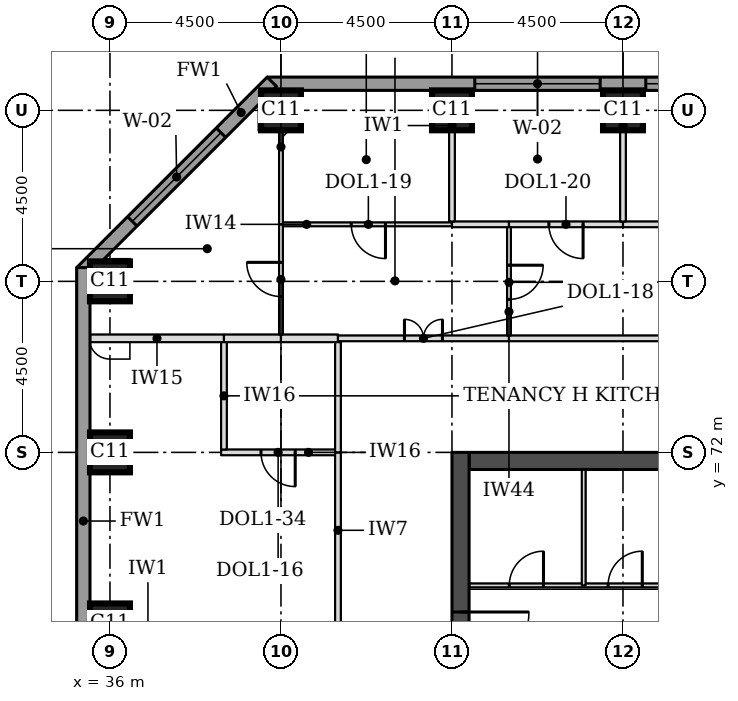
"""IFC4 building model, lengths in metres.
Left out: names, types, materials, properties, quantities, classifications, styles, units other than length and angle.
Written with IfcOpenShell. Run it as: python <this file> out.ifc"""

import sys

from ifc_helpers import new_model, si_unit, direction, frame, frame_2d, origin, origin_2d, place, context, subcontext, project, spatial, rectangle, extrude, element, fill, save


model = new_model("IFC4")
c1 = context("Model", 3, precision=1e-05, world=origin(), true_north=direction((0.0, 1.0)))
c2 = subcontext(c1, "Body", "Model", "MODEL_VIEW")
j1 = project(units=[si_unit("LENGTHUNIT", "METRE"), si_unit("PLANEANGLEUNIT", "RADIAN")], contexts=[c1])
p1 = place(None, origin())
s1 = spatial("IfcSite", under=j1, at=p1, CompositionType="ELEMENT")
p2 = place(p1, origin())
s2 = spatial("IfcBuilding", under=s1, at=p2, CompositionType="ELEMENT")
p3 = place(p2, frame((0.0, 0.0, 78.9)))
s3 = spatial("IfcBuildingStorey", under=s2, at=p3, CompositionType="ELEMENT", Elevation=78.9)
for number, where, z_axis, x_axis in (
    (1, (36.0, 67.5, 0.0), (0.0, 0.0, 1.0), (1.0, 0.0, 0.0)),
    (2, (36.0, 72.0, 0.0), (0.0, 0.0, 1.0), (1.0, 0.0, 0.0)),
    (3, (36.0, 76.5, 0.0), (0.0, 0.0, 1.0), (1.0, 0.0, 0.0)),
    (4, (40.5, 81.0, 0.0), (0.0, 0.0, 1.0), (1.0, 0.0, 0.0)),
    (5, (45.0, 81.0, 0.0), (0.0, 0.0, 1.0), (1.0, 0.0, 0.0)),
    (6, (49.5, 81.0, 0.0), (0.0, 0.0, 1.0), (1.0, 0.0, 0.0)),
):
    element("IfcColumn", number, at=place(p3, frame(where, z_axis=z_axis, x_axis=x_axis)), inside=s3, PredefinedType="COLUMN", context=c2, shape_type="SweptSolid", body=[
        extrude(rectangle(XDim=1.05, YDim=1.05, at=origin_2d()), origin(), (0.0, 0.0, 1.0), 3.7),
    ])
p4 = place(p3, frame((45.45, 71.775, 0.0), z_axis=(0.0, 0.0, 1.0), x_axis=(1.0, 0.0, 0.0)))
e7 = element("IfcWall", 7, at=p4, inside=s3, PredefinedType="SHEAR", context=c2, shape_type="SweptSolid", body=[
    extrude(rectangle(XDim=21.6, YDim=0.45, at=frame_2d((10.8, 0.0))), origin(), (0.0, 0.0, 1.0), 3.7),
])
p5 = place(p3, frame((45.225, 49.5, 0.0), z_axis=(0.0, 0.0, 1.0), x_axis=(0.0, 1.0, 0.0)))
e8 = element("IfcWall", 8, at=p5, inside=s3, PredefinedType="SHEAR", context=c2, shape_type="SweptSolid", body=[
    extrude(rectangle(XDim=22.5, YDim=0.45, at=frame_2d((11.25, 0.0))), origin(), (0.0, 0.0, 1.0), 3.7),
])
p6 = place(p5, frame((4.2, 0.0, 0.0)))
e9 = element("IfcOpeningElement", 9, at=p6, cuts=e8, PredefinedType="OPENING", context=c2, shape_type="SweptSolid", body=[
    extrude(rectangle(XDim=1.8, YDim=2.1, at=frame_2d((0.9, 1.05))), frame((0.0, 0.235, 0.0), z_axis=(0.0, -1.0, 0.0), x_axis=(1.0, 0.0, 0.0)), (0.0, 0.0, 1.0), 0.47),
])
p7 = place(p5, frame((6.9, 0.0, 0.0)))
e10 = element("IfcOpeningElement", 10, at=p7, cuts=e8, PredefinedType="OPENING", context=c2, shape_type="SweptSolid", body=[
    extrude(rectangle(XDim=1.1, YDim=2.1, at=frame_2d((0.55, 1.05))), frame((0.0, 0.235, 0.0), z_axis=(0.0, -1.0, 0.0), x_axis=(1.0, 0.0, 0.0)), (0.0, 0.0, 1.0), 0.47),
])
p8 = place(p5, frame((13.6, 0.0, 0.0)))
e11 = element("IfcOpeningElement", 11, at=p8, cuts=e8, PredefinedType="OPENING", context=c2, shape_type="SweptSolid", body=[
    extrude(rectangle(XDim=1.1, YDim=2.1, at=frame_2d((0.55, 1.05))), frame((0.0, 0.235, 0.0), z_axis=(0.0, -1.0, 0.0), x_axis=(1.0, 0.0, 0.0)), (0.0, 0.0, 1.0), 0.47),
])
p9 = place(p5, frame((16.5, 0.0, 0.0)))
e12 = element("IfcOpeningElement", 12, at=p9, cuts=e8, PredefinedType="OPENING", context=c2, shape_type="SweptSolid", body=[
    extrude(rectangle(XDim=1.8, YDim=2.1, at=frame_2d((0.9, 1.05))), frame((0.0, 0.235, 0.0), z_axis=(0.0, -1.0, 0.0), x_axis=(1.0, 0.0, 0.0)), (0.0, 0.0, 1.0), 0.47),
])
p10 = place(p3, frame((72.362, 81.7, 0.0), z_axis=(0.0, 0.0, 1.0), x_axis=(-1.0, 0.0, 0.0)))
e13 = element("IfcWall", 13, at=p10, inside=s3, PredefinedType="STANDARD", context=c2, shape_type="SweptSolid", body=[
    extrude(rectangle(XDim=32.225, YDim=0.35, at=frame_2d((16.112, 0.0))), origin(), (0.0, 0.0, 1.0), 3.525),
])
p11 = place(p10, frame((5.462, 0.0, 0.9)))
e14 = element("IfcOpeningElement", 14, at=p11, cuts=e13, PredefinedType="OPENING", context=c2, shape_type="SweptSolid", body=[
    extrude(rectangle(XDim=3.3, YDim=1.9, at=frame_2d((1.65, 0.95))), frame((0.0, 0.185, 0.0), z_axis=(0.0, -1.0, 0.0), x_axis=(1.0, 0.0, 0.0)), (0.0, 0.0, 1.0), 0.37),
])
p12 = place(p10, frame((9.962, 0.0, 0.9)))
e15 = element("IfcOpeningElement", 15, at=p12, cuts=e13, PredefinedType="OPENING", context=c2, shape_type="SweptSolid", body=[
    extrude(rectangle(XDim=3.3, YDim=1.9, at=frame_2d((1.65, 0.95))), frame((0.0, 0.185, 0.0), z_axis=(0.0, -1.0, 0.0), x_axis=(1.0, 0.0, 0.0)), (0.0, 0.0, 1.0), 0.37),
])
p13 = place(p10, frame((14.462, 0.0, 0.9)))
e16 = element("IfcOpeningElement", 16, at=p13, cuts=e13, PredefinedType="OPENING", context=c2, shape_type="SweptSolid", body=[
    extrude(rectangle(XDim=3.3, YDim=1.9, at=frame_2d((1.65, 0.95))), frame((0.0, 0.185, 0.0), z_axis=(0.0, -1.0, 0.0), x_axis=(1.0, 0.0, 0.0)), (0.0, 0.0, 1.0), 0.37),
])
p14 = place(p10, frame((18.962, 0.0, 0.9)))
e17 = element("IfcOpeningElement", 17, at=p14, cuts=e13, PredefinedType="OPENING", context=c2, shape_type="SweptSolid", body=[
    extrude(rectangle(XDim=3.3, YDim=1.9, at=frame_2d((1.65, 0.95))), frame((0.0, 0.185, 0.0), z_axis=(0.0, -1.0, 0.0), x_axis=(1.0, 0.0, 0.0)), (0.0, 0.0, 1.0), 0.37),
])
p15 = place(p10, frame((23.462, 0.0, 0.9)))
e18 = element("IfcOpeningElement", 18, at=p15, cuts=e13, PredefinedType="OPENING", context=c2, shape_type="SweptSolid", body=[
    extrude(rectangle(XDim=3.3, YDim=1.9, at=frame_2d((1.65, 0.95))), frame((0.0, 0.185, 0.0), z_axis=(0.0, -1.0, 0.0), x_axis=(1.0, 0.0, 0.0)), (0.0, 0.0, 1.0), 0.37),
])
p16 = place(p3, frame((40.261, 81.751, 0.0), z_axis=(0.0, 0.0, 1.0), x_axis=(-0.707106781187, -0.707106781187, 0.0)))
e19 = element("IfcWall", 19, at=p16, inside=s3, PredefinedType="STANDARD", context=c2, shape_type="SweptSolid", body=[
    extrude(rectangle(XDim=7.089, YDim=0.35, at=frame_2d((3.544, 0.0))), origin(), (0.0, 0.0, 1.0), 3.525),
])
p17 = place(p16, frame((1.894, 0.0, 0.9)))
e20 = element("IfcOpeningElement", 20, at=p17, cuts=e19, PredefinedType="OPENING", context=c2, shape_type="SweptSolid", body=[
    extrude(rectangle(XDim=3.3, YDim=1.9, at=frame_2d((1.65, 0.95))), frame((0.0, 0.185, 0.0), z_axis=(0.0, -1.0, 0.0), x_axis=(1.0, 0.0, 0.0)), (0.0, 0.0, 1.0), 0.37),
])
p18 = place(p3, frame((35.3, 76.862, 0.0), z_axis=(0.0, 0.0, 1.0), x_axis=(0.0, -1.0, 0.0)))
e21 = element("IfcWall", 21, at=p18, inside=s3, PredefinedType="STANDARD", context=c2, shape_type="SweptSolid", body=[
    extrude(rectangle(XDim=13.337, YDim=0.35, at=frame_2d((6.669, 0.0))), origin(), (0.0, 0.0, 1.0), 3.525),
])
p19 = place(p18, frame((9.537, 0.0, 0.9)))
e22 = element("IfcOpeningElement", 22, at=p19, cuts=e21, PredefinedType="OPENING", context=c2, shape_type="SweptSolid", body=[
    extrude(rectangle(XDim=3.3, YDim=1.9, at=frame_2d((1.65, 0.95))), frame((0.0, 0.185, 0.0), z_axis=(0.0, -1.0, 0.0), x_axis=(1.0, 0.0, 0.0)), (0.0, 0.0, 1.0), 0.37),
])
p20 = place(p3, frame((38.925, 72.0, 0.0), z_axis=(0.0, 0.0, 1.0), x_axis=(1.0, 0.0, 0.0)))
e23 = element("IfcWall", 23, at=p20, inside=s3, PredefinedType="PARTITIONING", context=c2, shape_type="SweptSolid", body=[
    extrude(rectangle(XDim=3.0, YDim=0.15, at=frame_2d((1.5, 0.0))), origin(), (0.0, 0.0, 1.0), 3.55),
])
p21 = place(p20, frame((1.05, 0.0, 0.0)))
e24 = element("IfcOpeningElement", 24, at=p21, cuts=e23, PredefinedType="OPENING", context=c2, shape_type="SweptSolid", body=[
    extrude(rectangle(XDim=0.9, YDim=2.1, at=frame_2d((0.45, 1.05))), frame((0.0, 0.085, 0.0), z_axis=(0.0, -1.0, 0.0), x_axis=(1.0, 0.0, 0.0)), (0.0, 0.0, 1.0), 0.17),
])
p22 = place(p3, frame((35.475, 75.0, 0.0), z_axis=(0.0, 0.0, 1.0), x_axis=(1.0, 0.0, 0.0)))
e25 = element("IfcWall", 25, at=p22, inside=s3, PredefinedType="PARTITIONING", context=c2, shape_type="SweptSolid", body=[
    extrude(rectangle(XDim=3.525, YDim=0.2, at=frame_2d((1.762, 0.0))), origin(), (0.0, 0.0, 1.0), 3.55),
])
for number, where, z_axis, x_axis in (
    (26, (39.0, 75.0, 0.0), (0.0, 0.0, 1.0), (1.0, 0.0, 0.0)),
    (27, (40.5, 75.0, 0.0), (0.0, 0.0, 1.0), (1.0, 0.0, 0.0)),
):
    element("IfcWall", number, at=place(p3, frame(where, z_axis=z_axis, x_axis=x_axis)), inside=s3, PredefinedType="PARTITIONING", context=c2, shape_type="SweptSolid", body=[
        extrude(rectangle(XDim=1.5, YDim=0.2, at=frame_2d((0.75, 0.0))), origin(), (0.0, 0.0, 1.0), 3.55),
    ])
p23 = place(p3, frame((42.0, 75.0, 0.0), z_axis=(0.0, 0.0, 1.0), x_axis=(1.0, 0.0, 0.0)))
e28 = element("IfcWall", 28, at=p23, inside=s3, PredefinedType="PARTITIONING", context=c2, shape_type="SweptSolid", body=[
    extrude(rectangle(XDim=4.5, YDim=0.15, at=frame_2d((2.25, 0.0))), origin(), (0.0, 0.0, 1.0), 3.55),
])
p24 = place(p23, frame((1.75, 0.0, 0.0)))
e29 = element("IfcOpeningElement", 29, at=p24, cuts=e28, PredefinedType="OPENING", context=c2, shape_type="SweptSolid", body=[
    extrude(rectangle(XDim=1.0, YDim=2.1, at=frame_2d((0.5, 1.05))), frame((0.0, 0.085, 0.0), z_axis=(0.0, -1.0, 0.0), x_axis=(1.0, 0.0, 0.0)), (0.0, 0.0, 1.0), 0.17),
])
p25 = place(p3, frame((46.5, 75.0, 0.0), z_axis=(0.0, 0.0, 1.0), x_axis=(1.0, 0.0, 0.0)))
e30 = element("IfcWall", 30, at=p25, inside=s3, PredefinedType="PARTITIONING", context=c2, shape_type="SweptSolid", body=[
    extrude(rectangle(XDim=24.0, YDim=0.15, at=frame_2d((12.0, 0.0))), origin(), (0.0, 0.0, 1.0), 3.55),
])
p26 = place(p3, frame((40.55, 78.0, 0.0), z_axis=(0.0, 0.0, 1.0), x_axis=(1.0, 0.0, 0.0)))
e31 = element("IfcWall", 31, at=p26, inside=s3, PredefinedType="PARTITIONING", context=c2, shape_type="SweptSolid", body=[
    extrude(rectangle(XDim=4.45, YDim=0.1, at=frame_2d((2.225, 0.0))), origin(), (0.0, 0.0, 1.0), 3.55),
])
p27 = place(p26, frame((1.8, 0.0, 0.0)))
e32 = element("IfcOpeningElement", 32, at=p27, cuts=e31, PredefinedType="OPENING", context=c2, shape_type="SweptSolid", body=[
    extrude(rectangle(XDim=0.9, YDim=2.1, at=frame_2d((0.45, 1.05))), frame((0.0, 0.06, 0.0), z_axis=(0.0, -1.0, 0.0), x_axis=(1.0, 0.0, 0.0)), (0.0, 0.0, 1.0), 0.12),
])
p28 = place(p3, frame((45.0, 78.0, 0.0), z_axis=(0.0, 0.0, 1.0), x_axis=(1.0, 0.0, 0.0)))
e33 = element("IfcWall", 33, at=p28, inside=s3, PredefinedType="PARTITIONING", context=c2, shape_type="SweptSolid", body=[
    extrude(rectangle(XDim=1.5, YDim=0.15, at=frame_2d((0.75, 0.0))), origin(), (0.0, 0.0, 1.0), 3.55),
])
p29 = place(p3, frame((46.5, 78.0, 0.0), z_axis=(0.0, 0.0, 1.0), x_axis=(1.0, 0.0, 0.0)))
e34 = element("IfcWall", 34, at=p29, inside=s3, PredefinedType="PARTITIONING", context=c2, shape_type="SweptSolid", body=[
    extrude(rectangle(XDim=3.0, YDim=0.15, at=frame_2d((1.5, 0.0))), origin(), (0.0, 0.0, 1.0), 3.55),
])
p30 = place(p29, frame((1.05, 0.0, 0.0)))
e35 = element("IfcOpeningElement", 35, at=p30, cuts=e34, PredefinedType="OPENING", context=c2, shape_type="SweptSolid", body=[
    extrude(rectangle(XDim=0.9, YDim=2.1, at=frame_2d((0.45, 1.05))), frame((0.0, 0.085, 0.0), z_axis=(0.0, -1.0, 0.0), x_axis=(1.0, 0.0, 0.0)), (0.0, 0.0, 1.0), 0.17),
])
p31 = place(p3, frame((49.5, 78.0, 0.0), z_axis=(0.0, 0.0, 1.0), x_axis=(1.0, 0.0, 0.0)))
e36 = element("IfcWall", 36, at=p31, inside=s3, PredefinedType="PARTITIONING", context=c2, shape_type="SweptSolid", body=[
    extrude(rectangle(XDim=4.575, YDim=0.15, at=frame_2d((2.288, 0.0))), origin(), (0.0, 0.0, 1.0), 3.55),
])
p32 = place(p31, frame((1.85, 0.0, 0.0)))
e37 = element("IfcOpeningElement", 37, at=p32, cuts=e36, PredefinedType="OPENING", context=c2, shape_type="SweptSolid", body=[
    extrude(rectangle(XDim=0.9, YDim=2.1, at=frame_2d((0.45, 1.05))), frame((0.0, 0.085, 0.0), z_axis=(0.0, -1.0, 0.0), x_axis=(1.0, 0.0, 0.0)), (0.0, 0.0, 1.0), 0.17),
])
p33 = place(p3, frame((42.0, 61.5, 0.0), z_axis=(0.0, 0.0, 1.0), x_axis=(0.0, 1.0, 0.0)))
e38 = element("IfcWall", 38, at=p33, inside=s3, PredefinedType="PARTITIONING", context=c2, shape_type="SweptSolid", body=[
    extrude(rectangle(XDim=10.5, YDim=0.15, at=frame_2d((5.25, 0.0))), origin(), (0.0, 0.0, 1.0), 3.55),
])
p34 = place(p3, frame((42.0, 72.0, 0.0), z_axis=(0.0, 0.0, 1.0), x_axis=(0.0, 1.0, 0.0)))
e39 = element("IfcWall", 39, at=p34, inside=s3, PredefinedType="PARTITIONING", context=c2, shape_type="SweptSolid", body=[
    extrude(rectangle(XDim=2.9, YDim=0.15, at=frame_2d((1.45, 0.0))), origin(), (0.0, 0.0, 1.0), 3.55),
])
p35 = place(p3, frame((39.0, 72.075, 0.0), z_axis=(0.0, 0.0, 1.0), x_axis=(0.0, 1.0, 0.0)))
e40 = element("IfcWall", 40, at=p35, inside=s3, PredefinedType="PARTITIONING", context=c2, shape_type="SweptSolid", body=[
    extrude(rectangle(XDim=2.825, YDim=0.15, at=frame_2d((1.413, 0.0))), origin(), (0.0, 0.0, 1.0), 3.55),
])
p36 = place(p3, frame((46.5, 75.075, 0.0), z_axis=(0.0, 0.0, 1.0), x_axis=(0.0, 1.0, 0.0)))
e41 = element("IfcWall", 41, at=p36, inside=s3, PredefinedType="PARTITIONING", context=c2, shape_type="SweptSolid", body=[
    extrude(rectangle(XDim=2.85, YDim=0.1, at=frame_2d((1.425, 0.0))), origin(), (0.0, 0.0, 1.0), 3.022),
])
p37 = place(p36, frame((0.95, 0.0, 0.0)))
e42 = element("IfcOpeningElement", 42, at=p37, cuts=e41, PredefinedType="OPENING", context=c2, shape_type="SweptSolid", body=[
    extrude(rectangle(XDim=0.9, YDim=2.1, at=frame_2d((0.45, 1.05))), frame((0.0, 0.06, 0.0), z_axis=(0.0, -1.0, 0.0), x_axis=(1.0, 0.0, 0.0)), (0.0, 0.0, 1.0), 0.12),
])
p38 = place(p3, frame((40.5, 75.1, 0.0), z_axis=(0.0, 0.0, 1.0), x_axis=(0.0, 1.0, 0.0)))
e43 = element("IfcWall", 43, at=p38, inside=s3, PredefinedType="PARTITIONING", context=c2, shape_type="SweptSolid", body=[
    extrude(rectangle(XDim=2.9, YDim=0.1, at=frame_2d((1.45, 0.0))), origin(), (0.0, 0.0, 1.0), 3.55),
])
p39 = place(p38, frame((1.0, 0.0, 0.0)))
e44 = element("IfcOpeningElement", 44, at=p39, cuts=e43, PredefinedType="OPENING", context=c2, shape_type="SweptSolid", body=[
    extrude(rectangle(XDim=0.9, YDim=2.1, at=frame_2d((0.45, 1.05))), frame((0.0, 0.06, 0.0), z_axis=(0.0, -1.0, 0.0), x_axis=(1.0, 0.0, 0.0)), (0.0, 0.0, 1.0), 0.12),
])
p40 = place(p3, frame((40.5, 78.0, 0.0), z_axis=(0.0, 0.0, 1.0), x_axis=(0.0, 1.0, 0.0)))
e45 = element("IfcWall", 45, at=p40, inside=s3, PredefinedType="PARTITIONING", context=c2, shape_type="SweptSolid", body=[
    extrude(rectangle(XDim=2.475, YDim=0.1, at=frame_2d((1.238, 0.0))), origin(), (0.0, 0.0, 1.0), 3.55),
])
for number, where, z_axis, x_axis in (
    (46, (45.0, 78.075, 0.0), (0.0, 0.0, 1.0), (0.0, 1.0, 0.0)),
    (47, (49.5, 78.075, 0.0), (0.0, 0.0, 1.0), (0.0, 1.0, 0.0)),
):
    element("IfcWall", number, at=place(p3, frame(where, z_axis=z_axis, x_axis=x_axis)), inside=s3, PredefinedType="PARTITIONING", context=c2, shape_type="SweptSolid", body=[
        extrude(rectangle(XDim=3.45, YDim=0.15, at=frame_2d((1.725, 0.0))), origin(), (0.0, 0.0, 1.0), 3.55),
    ])
p41 = place(p3, frame((45.45, 68.5, 0.0), z_axis=(0.0, 0.0, 1.0), x_axis=(1.0, 0.0, 0.0)))
e48 = element("IfcWall", 48, at=p41, inside=s3, PredefinedType="PARTITIONING", context=c2, shape_type="SweptSolid", body=[
    extrude(rectangle(XDim=5.2, YDim=0.1, at=frame_2d((2.6, 0.0))), origin(), (0.0, 0.0, 1.0), 3.55),
])
p42 = place(p41, frame((1.058, 0.0, 0.0)))
e49 = element("IfcOpeningElement", 49, at=p42, cuts=e48, PredefinedType="OPENING", context=c2, shape_type="SweptSolid", body=[
    extrude(rectangle(XDim=0.9, YDim=2.1, at=frame_2d((0.45, 1.05))), frame((0.0, 0.06, 0.0), z_axis=(0.0, -1.0, 0.0), x_axis=(1.0, 0.0, 0.0)), (0.0, 0.0, 1.0), 0.12),
])
p43 = place(p41, frame((3.658, 0.0, 0.0)))
e50 = element("IfcOpeningElement", 50, at=p43, cuts=e48, PredefinedType="OPENING", context=c2, shape_type="SweptSolid", body=[
    extrude(rectangle(XDim=0.9, YDim=2.1, at=frame_2d((0.45, 1.05))), frame((0.0, 0.06, 0.0), z_axis=(0.0, -1.0, 0.0), x_axis=(1.0, 0.0, 0.0)), (0.0, 0.0, 1.0), 0.12),
])
p44 = place(p3, frame((48.466, 68.5, 0.0), z_axis=(0.0, 0.0, 1.0), x_axis=(0.0, 1.0, 0.0)))
e51 = element("IfcWall", 51, at=p44, inside=s3, PredefinedType="PARTITIONING", context=c2, shape_type="SweptSolid", body=[
    extrude(rectangle(XDim=3.05, YDim=0.1, at=frame_2d((1.525, 0.0))), origin(), (0.0, 0.0, 1.0), 3.55),
])
p45 = place(p14, origin())
e52 = element("IfcWindow", 52, at=p45, inside=s3, PartitioningType="SINGLE_PANEL", PredefinedType="WINDOW", context=c2, shape_type="SweptSolid", body=[
    extrude(rectangle(XDim=3.3, YDim=1.9, at=frame_2d((1.65, 0.95))), frame((0.0, 0.085, 0.0), z_axis=(0.0, -1.0, 0.0), x_axis=(1.0, 0.0, 0.0)), (0.0, 0.0, 1.0), 0.06),
])
fill(e17, e52)
p46 = place(p15, origin())
e53 = element("IfcWindow", 53, at=p46, inside=s3, PartitioningType="SINGLE_PANEL", PredefinedType="WINDOW", context=c2, shape_type="SweptSolid", body=[
    extrude(rectangle(XDim=3.3, YDim=1.9, at=frame_2d((1.65, 0.95))), frame((0.0, 0.085, 0.0), z_axis=(0.0, -1.0, 0.0), x_axis=(1.0, 0.0, 0.0)), (0.0, 0.0, 1.0), 0.06),
])
fill(e18, e53)
p47 = place(p17, origin())
e54 = element("IfcWindow", 54, at=p47, inside=s3, PartitioningType="SINGLE_PANEL", PredefinedType="WINDOW", context=c2, shape_type="SweptSolid", body=[
    extrude(rectangle(XDim=3.3, YDim=1.9, at=frame_2d((1.65, 0.95))), frame((0.0, 0.085, 0.0), z_axis=(0.0, -1.0, 0.0), x_axis=(1.0, 0.0, 0.0)), (0.0, 0.0, 1.0), 0.06),
])
fill(e20, e54)
p48 = place(p24, origin())
e55 = element("IfcDoor", 55, at=p48, inside=s3, OperationType="DOUBLE_DOOR_SINGLE_SWING", PredefinedType="DOOR", context=c2, shape_type="SweptSolid", body=[
    extrude(rectangle(XDim=1.0, YDim=2.1, at=frame_2d((0.5, 1.05))), frame((0.0, 0.025, 0.0), z_axis=(0.0, -1.0, 0.0), x_axis=(1.0, 0.0, 0.0)), (0.0, 0.0, 1.0), 0.05),
])
fill(e29, e55)
p49 = place(p37, frame((0.9, 0.0, 0.0), z_axis=(0.0, 0.0, 1.0), x_axis=(-1.0, 0.0, 0.0)))
e56 = element("IfcDoor", 56, at=p49, inside=s3, OperationType="SINGLE_SWING_LEFT", PredefinedType="DOOR", context=c2, shape_type="SweptSolid", body=[
    extrude(rectangle(XDim=0.9, YDim=2.1, at=frame_2d((0.45, 1.05))), frame((0.0, 0.025, 0.0), z_axis=(0.0, -1.0, 0.0), x_axis=(1.0, 0.0, 0.0)), (0.0, 0.0, 1.0), 0.05),
])
fill(e42, e56)
p50 = place(p39, origin())
e57 = element("IfcDoor", 57, at=p50, inside=s3, OperationType="SINGLE_SWING_RIGHT", PredefinedType="DOOR", context=c2, shape_type="SweptSolid", body=[
    extrude(rectangle(XDim=0.9, YDim=2.1, at=frame_2d((0.45, 1.05))), frame((0.0, 0.025, 0.0), z_axis=(0.0, -1.0, 0.0), x_axis=(1.0, 0.0, 0.0)), (0.0, 0.0, 1.0), 0.05),
])
fill(e44, e57)
p51 = place(p27, frame((0.9, 0.0, 0.0), z_axis=(0.0, 0.0, 1.0), x_axis=(-1.0, 0.0, 0.0)))
e58 = element("IfcDoor", 58, at=p51, inside=s3, OperationType="SINGLE_SWING_LEFT", PredefinedType="DOOR", context=c2, shape_type="SweptSolid", body=[
    extrude(rectangle(XDim=0.9, YDim=2.1, at=frame_2d((0.45, 1.05))), frame((0.0, 0.025, 0.0), z_axis=(0.0, -1.0, 0.0), x_axis=(1.0, 0.0, 0.0)), (0.0, 0.0, 1.0), 0.05),
])
fill(e32, e58)
p52 = place(p30, frame((0.9, 0.0, 0.0), z_axis=(0.0, 0.0, 1.0), x_axis=(-1.0, 0.0, 0.0)))
e59 = element("IfcDoor", 59, at=p52, inside=s3, OperationType="SINGLE_SWING_LEFT", PredefinedType="DOOR", context=c2, shape_type="SweptSolid", body=[
    extrude(rectangle(XDim=0.9, YDim=2.1, at=frame_2d((0.45, 1.05))), frame((0.0, 0.025, 0.0), z_axis=(0.0, -1.0, 0.0), x_axis=(1.0, 0.0, 0.0)), (0.0, 0.0, 1.0), 0.05),
])
fill(e35, e59)
p53 = place(p21, frame((0.9, 0.0, 0.0), z_axis=(0.0, 0.0, 1.0), x_axis=(-1.0, 0.0, 0.0)))
e60 = element("IfcDoor", 60, at=p53, inside=s3, OperationType="SINGLE_SWING_LEFT", PredefinedType="DOOR", context=c2, shape_type="SweptSolid", body=[
    extrude(rectangle(XDim=0.9, YDim=2.1, at=frame_2d((0.45, 1.05))), frame((0.0, 0.025, 0.0), z_axis=(0.0, -1.0, 0.0), x_axis=(1.0, 0.0, 0.0)), (0.0, 0.0, 1.0), 0.05),
])
fill(e24, e60)
p54 = place(p9, frame((1.8, 0.0, 0.0), z_axis=(0.0, 0.0, 1.0), x_axis=(-1.0, 0.0, 0.0)))
e61 = element("IfcDoor", 61, at=p54, inside=s3, OperationType="SINGLE_SWING_LEFT", PredefinedType="DOOR", context=c2, shape_type="SweptSolid", body=[
    extrude(rectangle(XDim=1.8, YDim=2.1, at=frame_2d((0.9, 1.05))), frame((0.0, 0.025, 0.0), z_axis=(0.0, -1.0, 0.0), x_axis=(1.0, 0.0, 0.0)), (0.0, 0.0, 1.0), 0.05),
])
fill(e12, e61)
p55 = place(p42, origin())
e62 = element("IfcDoor", 62, at=p55, inside=s3, OperationType="SINGLE_SWING_RIGHT", PredefinedType="DOOR", context=c2, shape_type="SweptSolid", body=[
    extrude(rectangle(XDim=0.9, YDim=2.1, at=frame_2d((0.45, 1.05))), frame((0.0, 0.025, 0.0), z_axis=(0.0, -1.0, 0.0), x_axis=(1.0, 0.0, 0.0)), (0.0, 0.0, 1.0), 0.05),
])
fill(e49, e62)
p56 = place(p43, origin())
e63 = element("IfcDoor", 63, at=p56, inside=s3, OperationType="SINGLE_SWING_RIGHT", PredefinedType="DOOR", context=c2, shape_type="SweptSolid", body=[
    extrude(rectangle(XDim=0.9, YDim=2.1, at=frame_2d((0.45, 1.05))), frame((0.0, 0.025, 0.0), z_axis=(0.0, -1.0, 0.0), x_axis=(1.0, 0.0, 0.0)), (0.0, 0.0, 1.0), 0.05),
])
fill(e50, e63)
save(model, sys.argv[1])
